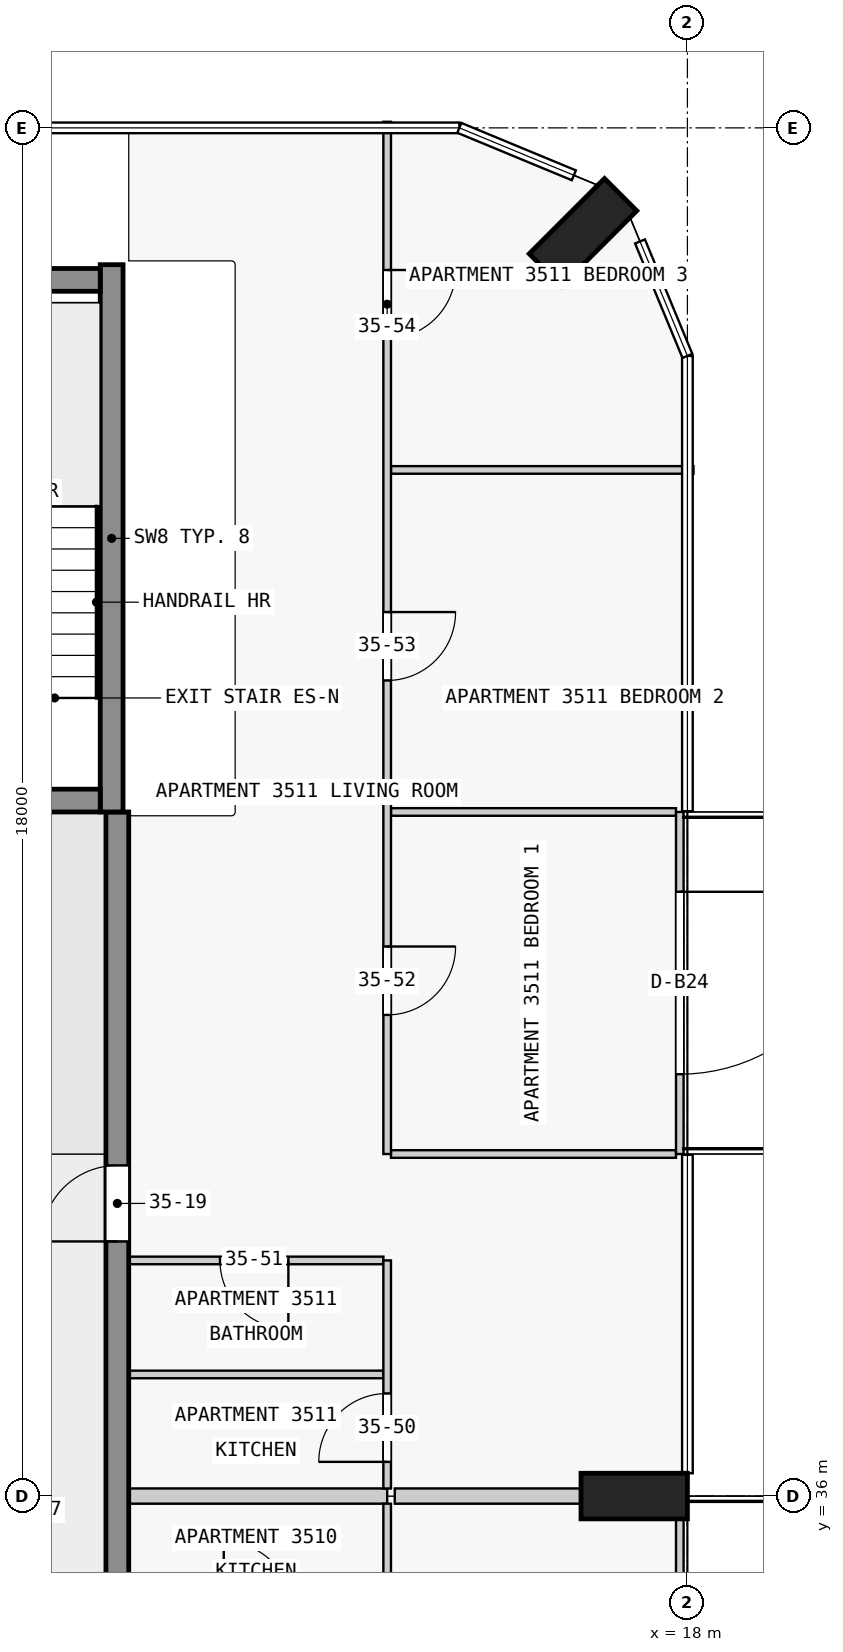
"""IFC4 building model, lengths in metres.
Left out: names, types, materials, properties, quantities, classifications, styles, units other than length and angle.
Written with IfcOpenShell. Run it as: python <this file> out.ifc"""

import sys

from ifc_helpers import new_model, si_unit, direction, frame, frame_2d, origin, origin_2d, place, context, subcontext, project, spatial, rectangle, extrude, element, fill, save


model = new_model("IFC4")
c1 = context("Model", 3, precision=1e-05, world=origin(), true_north=direction((0.0, 1.0)))
c2 = subcontext(c1, "Body", "Model", "MODEL_VIEW")
j1 = project(units=[si_unit("LENGTHUNIT", "METRE"), si_unit("PLANEANGLEUNIT", "RADIAN")], contexts=[c1])
p1 = place(None, origin())
s1 = spatial("IfcSite", under=j1, at=p1, CompositionType="ELEMENT")
p2 = place(p1, origin())
s2 = spatial("IfcBuilding", under=s1, at=p2, CompositionType="ELEMENT")
p3 = place(p2, frame((0.0, 0.0, 139.4)))
s3 = spatial("IfcBuildingStorey", under=s2, at=p3, CompositionType="ELEMENT", Elevation=139.4)
for number, where, z_axis, x_axis in (
    (1, (17.3, 36.0, 0.0), (0.0, 0.0, 1.0), (0.0, 1.0, 0.0)),
    (2, (16.626, 52.626, 0.0), (0.0, 0.0, 1.0), (-0.707, 0.707, 0.0)),
):
    element("IfcColumn", number, at=place(p3, frame(where, z_axis=z_axis, x_axis=x_axis)), inside=s3, PredefinedType="COLUMN", context=c2, shape_type="SweptSolid", body=[
        extrude(rectangle(XDim=0.6, YDim=1.4, at=origin_2d()), origin(), (0.0, 0.0, 1.0), 3.5),
    ])
p4 = place(p3, frame((7.725, 45.15, 0.0), z_axis=(0.0, 0.0, 1.0), x_axis=(1.0, 0.0, 0.0)))
e3 = element("IfcWall", 3, at=p4, inside=s3, PredefinedType="SHEAR", context=c2, shape_type="SweptSolid", body=[
    extrude(rectangle(XDim=2.55, YDim=0.3, at=frame_2d((1.275, 0.0))), origin(), (0.0, 0.0, 1.0), 3.5),
])
p5 = place(p4, frame((0.725, 0.0, 0.0)))
e4 = element("IfcOpeningElement", 4, at=p5, cuts=e3, PredefinedType="OPENING", context=c2, shape_type="SweptSolid", body=[
    extrude(rectangle(XDim=1.1, YDim=2.1, at=frame_2d((0.55, 1.05))), frame((0.0, 0.16, 0.0), z_axis=(0.0, -1.0, 0.0), x_axis=(1.0, 0.0, 0.0)), (0.0, 0.0, 1.0), 0.32),
])
p6 = place(p3, frame((7.725, 52.0, 0.0), z_axis=(0.0, 0.0, 1.0), x_axis=(1.0, 0.0, 0.0)))
e5 = element("IfcWall", 5, at=p6, inside=s3, PredefinedType="SHEAR", context=c2, shape_type="SweptSolid", body=[
    extrude(rectangle(XDim=2.55, YDim=0.3, at=frame_2d((1.275, 0.0))), origin(), (0.0, 0.0, 1.0), 3.5),
])
p7 = place(p3, frame((10.425, 45.0, 0.0), z_axis=(0.0, 0.0, 1.0), x_axis=(0.0, 1.0, 0.0)))
e6 = element("IfcWall", 6, at=p7, inside=s3, PredefinedType="SHEAR", context=c2, shape_type="SweptSolid", body=[
    extrude(rectangle(XDim=7.2, YDim=0.3, at=frame_2d((3.6, 0.0))), origin(), (0.0, 0.0, 1.0), 3.5),
])
p8 = place(p3, frame((10.5, 18.0, 0.0), z_axis=(0.0, 0.0, 1.0), x_axis=(0.0, 1.0, 0.0)))
e7 = element("IfcWall", 7, at=p8, inside=s3, PredefinedType="SHEAR", context=c2, shape_type="SweptSolid", body=[
    extrude(rectangle(XDim=27.0, YDim=0.3, at=frame_2d((13.5, 0.0))), origin(), (0.0, 0.0, 1.0), 3.25),
])
p9 = place(p8, frame((1.75, 0.0, 0.0)))
e8 = element("IfcOpeningElement", 8, at=p9, cuts=e7, PredefinedType="OPENING", context=c2, shape_type="SweptSolid", body=[
    extrude(rectangle(XDim=1.0, YDim=2.1, at=frame_2d((0.5, 1.05))), frame((0.0, 0.16, 0.0), z_axis=(0.0, -1.0, 0.0), x_axis=(1.0, 0.0, 0.0)), (0.0, 0.0, 1.0), 0.32),
])
p10 = place(p8, frame((6.25, 0.0, 0.0)))
e9 = element("IfcOpeningElement", 9, at=p10, cuts=e7, PredefinedType="OPENING", context=c2, shape_type="SweptSolid", body=[
    extrude(rectangle(XDim=1.0, YDim=2.1, at=frame_2d((0.5, 1.05))), frame((0.0, 0.16, 0.0), z_axis=(0.0, -1.0, 0.0), x_axis=(1.0, 0.0, 0.0)), (0.0, 0.0, 1.0), 0.32),
])
p11 = place(p8, frame((10.35, 0.0, 0.0)))
e10 = element("IfcOpeningElement", 10, at=p11, cuts=e7, PredefinedType="OPENING", context=c2, shape_type="SweptSolid", body=[
    extrude(rectangle(XDim=1.8, YDim=2.1, at=frame_2d((0.9, 1.05))), frame((0.0, 0.16, 0.0), z_axis=(0.0, -1.0, 0.0), x_axis=(1.0, 0.0, 0.0)), (0.0, 0.0, 1.0), 0.32),
])
p12 = place(p8, frame((15.25, 0.0, 0.0)))
e11 = element("IfcOpeningElement", 11, at=p12, cuts=e7, PredefinedType="OPENING", context=c2, shape_type="SweptSolid", body=[
    extrude(rectangle(XDim=1.0, YDim=2.1, at=frame_2d((0.5, 1.05))), frame((0.0, 0.16, 0.0), z_axis=(0.0, -1.0, 0.0), x_axis=(1.0, 0.0, 0.0)), (0.0, 0.0, 1.0), 0.32),
])
p13 = place(p8, frame((21.35, 0.0, 0.0)))
e12 = element("IfcOpeningElement", 12, at=p13, cuts=e7, PredefinedType="OPENING", context=c2, shape_type="SweptSolid", body=[
    extrude(rectangle(XDim=1.0, YDim=2.1, at=frame_2d((0.5, 1.05))), frame((0.0, 0.16, 0.0), z_axis=(0.0, -1.0, 0.0), x_axis=(1.0, 0.0, 0.0)), (0.0, 0.0, 1.0), 0.32),
])
p14 = place(p3, frame((17.9, 36.0, 0.0), z_axis=(0.0, 0.0, 1.0), x_axis=(0.0, -1.0, 0.0)))
e13 = element("IfcWall", 13, at=p14, inside=s3, PredefinedType="STANDARD", context=c2, shape_type="SweptSolid", body=[
    extrude(rectangle(XDim=4.5, YDim=0.1, at=frame_2d((2.25, 0.0))), origin(), (0.0, 0.0, 1.0), 3.25),
])
p15 = place(p14, frame((1.05, 0.0, 0.0)))
e14 = element("IfcOpeningElement", 14, at=p15, cuts=e13, PredefinedType="OPENING", context=c2, shape_type="SweptSolid", body=[
    extrude(rectangle(XDim=2.4, YDim=2.4, at=frame_2d((1.2, 1.2))), frame((0.0, 0.06, 0.0), z_axis=(0.0, -1.0, 0.0), x_axis=(1.0, 0.0, 0.0)), (0.0, 0.0, 1.0), 0.12),
])
p16 = place(p3, frame((17.9, 45.0, 0.0), z_axis=(0.0, 0.0, 1.0), x_axis=(0.0, -1.0, 0.0)))
e15 = element("IfcWall", 15, at=p16, inside=s3, PredefinedType="STANDARD", context=c2, shape_type="SweptSolid", body=[
    extrude(rectangle(XDim=4.5, YDim=0.1, at=frame_2d((2.25, 0.0))), origin(), (0.0, 0.0, 1.0), 3.25),
])
p17 = place(p16, frame((1.05, 0.0, 0.0)))
e16 = element("IfcOpeningElement", 16, at=p17, cuts=e15, PredefinedType="OPENING", context=c2, shape_type="SweptSolid", body=[
    extrude(rectangle(XDim=2.4, YDim=2.4, at=frame_2d((1.2, 1.2))), frame((0.0, 0.06, 0.0), z_axis=(0.0, -1.0, 0.0), x_axis=(1.0, 0.0, 0.0)), (0.0, 0.0, 1.0), 0.12),
])
p18 = place(p3, frame((14.05, 36.0, 0.0), z_axis=(0.0, 0.0, 1.0), x_axis=(-1.0, 0.0, 0.0)))
e17 = element("IfcWall", 17, at=p18, inside=s3, PredefinedType="PARTITIONING", context=c2, shape_type="SweptSolid", body=[
    extrude(rectangle(XDim=3.4, YDim=0.2, at=frame_2d((1.7, 0.0))), origin(), (0.0, 0.0, 1.0), 3.25),
])
p19 = place(p3, frame((14.15, 36.0, 0.0), z_axis=(0.0, 0.0, 1.0), x_axis=(1.0, 0.0, 0.0)))
e18 = element("IfcWall", 18, at=p19, inside=s3, PredefinedType="PARTITIONING", context=c2, shape_type="SweptSolid", body=[
    extrude(rectangle(XDim=2.45, YDim=0.2, at=frame_2d((1.225, 0.0))), origin(), (0.0, 0.0, 1.0), 3.25),
])
p20 = place(p3, frame((14.0, 37.6, 0.0), z_axis=(0.0, 0.0, 1.0), x_axis=(-1.0, 0.0, 0.0)))
e19 = element("IfcWall", 19, at=p20, inside=s3, PredefinedType="PARTITIONING", context=c2, shape_type="SweptSolid", body=[
    extrude(rectangle(XDim=3.35, YDim=0.1, at=frame_2d((1.675, 0.0))), origin(), (0.0, 0.0, 1.0), 3.25),
])
p21 = place(p3, frame((14.0, 39.1, 0.0), z_axis=(0.0, 0.0, 1.0), x_axis=(-1.0, 0.0, 0.0)))
e20 = element("IfcWall", 20, at=p21, inside=s3, PredefinedType="PARTITIONING", context=c2, shape_type="SweptSolid", body=[
    extrude(rectangle(XDim=3.35, YDim=0.1, at=frame_2d((1.675, 0.0))), origin(), (0.0, 0.0, 1.0), 3.25),
])
p22 = place(p21, frame((1.25, 0.0, 0.0)))
e21 = element("IfcOpeningElement", 21, at=p22, cuts=e20, PredefinedType="OPENING", context=c2, shape_type="SweptSolid", body=[
    extrude(rectangle(XDim=0.9, YDim=2.1, at=frame_2d((0.45, 1.05))), frame((0.0, 0.06, 0.0), z_axis=(0.0, -1.0, 0.0), x_axis=(1.0, 0.0, 0.0)), (0.0, 0.0, 1.0), 0.12),
])
for number, where, z_axis, x_axis in (
    (22, (14.1, 40.5, 0.0), (0.0, 0.0, 1.0), (1.0, 0.0, 0.0)),
    (23, (17.85, 45.0, 0.0), (0.0, 0.0, 1.0), (-1.0, 0.0, 0.0)),
):
    element("IfcWall", number, at=place(p3, frame(where, z_axis=z_axis, x_axis=x_axis)), inside=s3, PredefinedType="PARTITIONING", context=c2, shape_type="SweptSolid", body=[
        extrude(rectangle(XDim=3.75, YDim=0.1, at=frame_2d((1.875, 0.0))), origin(), (0.0, 0.0, 1.0), 3.25),
    ])
p23 = place(p3, frame((18.08, 49.5, 0.0), z_axis=(0.0, 0.0, 1.0), x_axis=(-1.0, 0.0, 0.0)))
e24 = element("IfcWall", 24, at=p23, inside=s3, PredefinedType="PARTITIONING", context=c2, shape_type="SweptSolid", body=[
    extrude(rectangle(XDim=3.98, YDim=0.1, at=frame_2d((1.99, 0.0))), origin(), (0.0, 0.0, 1.0), 3.25),
])
p24 = place(p3, frame((14.05, 54.08, 0.0), z_axis=(0.0, 0.0, 1.0), x_axis=(0.0, -1.0, 0.0)))
e25 = element("IfcWall", 25, at=p24, inside=s3, PredefinedType="PARTITIONING", context=c2, shape_type="SweptSolid", body=[
    extrude(rectangle(XDim=13.58, YDim=0.1, at=frame_2d((6.79, 0.0))), origin(), (0.0, 0.0, 1.0), 3.25),
])
p25 = place(p24, frame((10.85, 0.0, 0.0)))
e26 = element("IfcOpeningElement", 26, at=p25, cuts=e25, PredefinedType="OPENING", context=c2, shape_type="SweptSolid", body=[
    extrude(rectangle(XDim=0.9, YDim=2.1, at=frame_2d((0.45, 1.05))), frame((0.0, 0.06, 0.0), z_axis=(0.0, -1.0, 0.0), x_axis=(1.0, 0.0, 0.0)), (0.0, 0.0, 1.0), 0.12),
])
p26 = place(p24, frame((6.45, 0.0, 0.0)))
e27 = element("IfcOpeningElement", 27, at=p26, cuts=e25, PredefinedType="OPENING", context=c2, shape_type="SweptSolid", body=[
    extrude(rectangle(XDim=0.9, YDim=2.1, at=frame_2d((0.45, 1.05))), frame((0.0, 0.06, 0.0), z_axis=(0.0, -1.0, 0.0), x_axis=(1.0, 0.0, 0.0)), (0.0, 0.0, 1.0), 0.12),
])
p27 = place(p24, frame((1.95, 0.0, 0.0)))
e28 = element("IfcOpeningElement", 28, at=p27, cuts=e25, PredefinedType="OPENING", context=c2, shape_type="SweptSolid", body=[
    extrude(rectangle(XDim=0.9, YDim=2.1, at=frame_2d((0.45, 1.05))), frame((0.0, 0.06, 0.0), z_axis=(0.0, -1.0, 0.0), x_axis=(1.0, 0.0, 0.0)), (0.0, 0.0, 1.0), 0.12),
])
p28 = place(p3, frame((14.05, 34.5, 0.0), z_axis=(0.0, 0.0, 1.0), x_axis=(0.0, 1.0, 0.0)))
e29 = element("IfcWall", 29, at=p28, inside=s3, PredefinedType="PARTITIONING", context=c2, shape_type="SweptSolid", body=[
    extrude(rectangle(XDim=1.4, YDim=0.1, at=frame_2d((0.7, 0.0))), origin(), (0.0, 0.0, 1.0), 3.25),
])
p29 = place(p3, frame((14.05, 36.1, 0.0), z_axis=(0.0, 0.0, 1.0), x_axis=(0.0, 1.0, 0.0)))
e30 = element("IfcWall", 30, at=p29, inside=s3, PredefinedType="PARTITIONING", context=c2, shape_type="SweptSolid", body=[
    extrude(rectangle(XDim=3.0, YDim=0.1, at=frame_2d((1.5, 0.0))), origin(), (0.0, 0.0, 1.0), 3.25),
])
p30 = place(p29, frame((0.35, 0.0, 0.0)))
e31 = element("IfcOpeningElement", 31, at=p30, cuts=e30, PredefinedType="OPENING", context=c2, shape_type="SweptSolid", body=[
    extrude(rectangle(XDim=0.9, YDim=2.1, at=frame_2d((0.45, 1.05))), frame((0.0, 0.06, 0.0), z_axis=(0.0, -1.0, 0.0), x_axis=(1.0, 0.0, 0.0)), (0.0, 0.0, 1.0), 0.12),
])
p31 = place(p17, origin())
e32 = element("IfcDoor", 32, at=p31, inside=s3, OperationType="SINGLE_SWING_LEFT", PredefinedType="DOOR", context=c2, shape_type="SweptSolid", body=[
    extrude(rectangle(XDim=2.4, YDim=2.4, at=frame_2d((1.2, 1.2))), frame((0.0, 0.025, 0.0), z_axis=(0.0, -1.0, 0.0), x_axis=(1.0, 0.0, 0.0)), (0.0, 0.0, 1.0), 0.05),
])
fill(e16, e32)
p32 = place(p13, origin())
e33 = element("IfcDoor", 33, at=p32, inside=s3, OperationType="SINGLE_SWING_RIGHT", PredefinedType="DOOR", context=c2, shape_type="SweptSolid", body=[
    extrude(rectangle(XDim=1.0, YDim=2.1, at=frame_2d((0.5, 1.05))), frame((0.0, 0.025, 0.0), z_axis=(0.0, -1.0, 0.0), x_axis=(1.0, 0.0, 0.0)), (0.0, 0.0, 1.0), 0.05),
])
fill(e12, e33)
p33 = place(p30, origin())
e34 = element("IfcDoor", 34, at=p33, inside=s3, OperationType="SINGLE_SWING_LEFT", PredefinedType="DOOR", context=c2, shape_type="SweptSolid", body=[
    extrude(rectangle(XDim=0.9, YDim=2.1, at=frame_2d((0.45, 1.05))), frame((0.0, 0.025, 0.0), z_axis=(0.0, -1.0, 0.0), x_axis=(1.0, 0.0, 0.0)), (0.0, 0.0, 1.0), 0.05),
])
fill(e31, e34)
p34 = place(p22, origin())
e35 = element("IfcDoor", 35, at=p34, inside=s3, OperationType="SINGLE_SWING_RIGHT", PredefinedType="DOOR", context=c2, shape_type="SweptSolid", body=[
    extrude(rectangle(XDim=0.9, YDim=2.1, at=frame_2d((0.45, 1.05))), frame((0.0, 0.025, 0.0), z_axis=(0.0, -1.0, 0.0), x_axis=(1.0, 0.0, 0.0)), (0.0, 0.0, 1.0), 0.05),
])
fill(e21, e35)
p35 = place(p25, origin())
e36 = element("IfcDoor", 36, at=p35, inside=s3, OperationType="SINGLE_SWING_RIGHT", PredefinedType="DOOR", context=c2, shape_type="SweptSolid", body=[
    extrude(rectangle(XDim=0.9, YDim=2.1, at=frame_2d((0.45, 1.05))), frame((0.0, 0.025, 0.0), z_axis=(0.0, -1.0, 0.0), x_axis=(1.0, 0.0, 0.0)), (0.0, 0.0, 1.0), 0.05),
])
fill(e26, e36)
p36 = place(p26, origin())
e37 = element("IfcDoor", 37, at=p36, inside=s3, OperationType="SINGLE_SWING_RIGHT", PredefinedType="DOOR", context=c2, shape_type="SweptSolid", body=[
    extrude(rectangle(XDim=0.9, YDim=2.1, at=frame_2d((0.45, 1.05))), frame((0.0, 0.025, 0.0), z_axis=(0.0, -1.0, 0.0), x_axis=(1.0, 0.0, 0.0)), (0.0, 0.0, 1.0), 0.05),
])
fill(e27, e37)
p37 = place(p27, origin())
e38 = element("IfcDoor", 38, at=p37, inside=s3, OperationType="SINGLE_SWING_LEFT", PredefinedType="DOOR", context=c2, shape_type="SweptSolid", body=[
    extrude(rectangle(XDim=0.9, YDim=2.1, at=frame_2d((0.45, 1.05))), frame((0.0, 0.025, 0.0), z_axis=(0.0, -1.0, 0.0), x_axis=(1.0, 0.0, 0.0)), (0.0, 0.0, 1.0), 0.05),
])
fill(e28, e38)
save(model, sys.argv[1])
